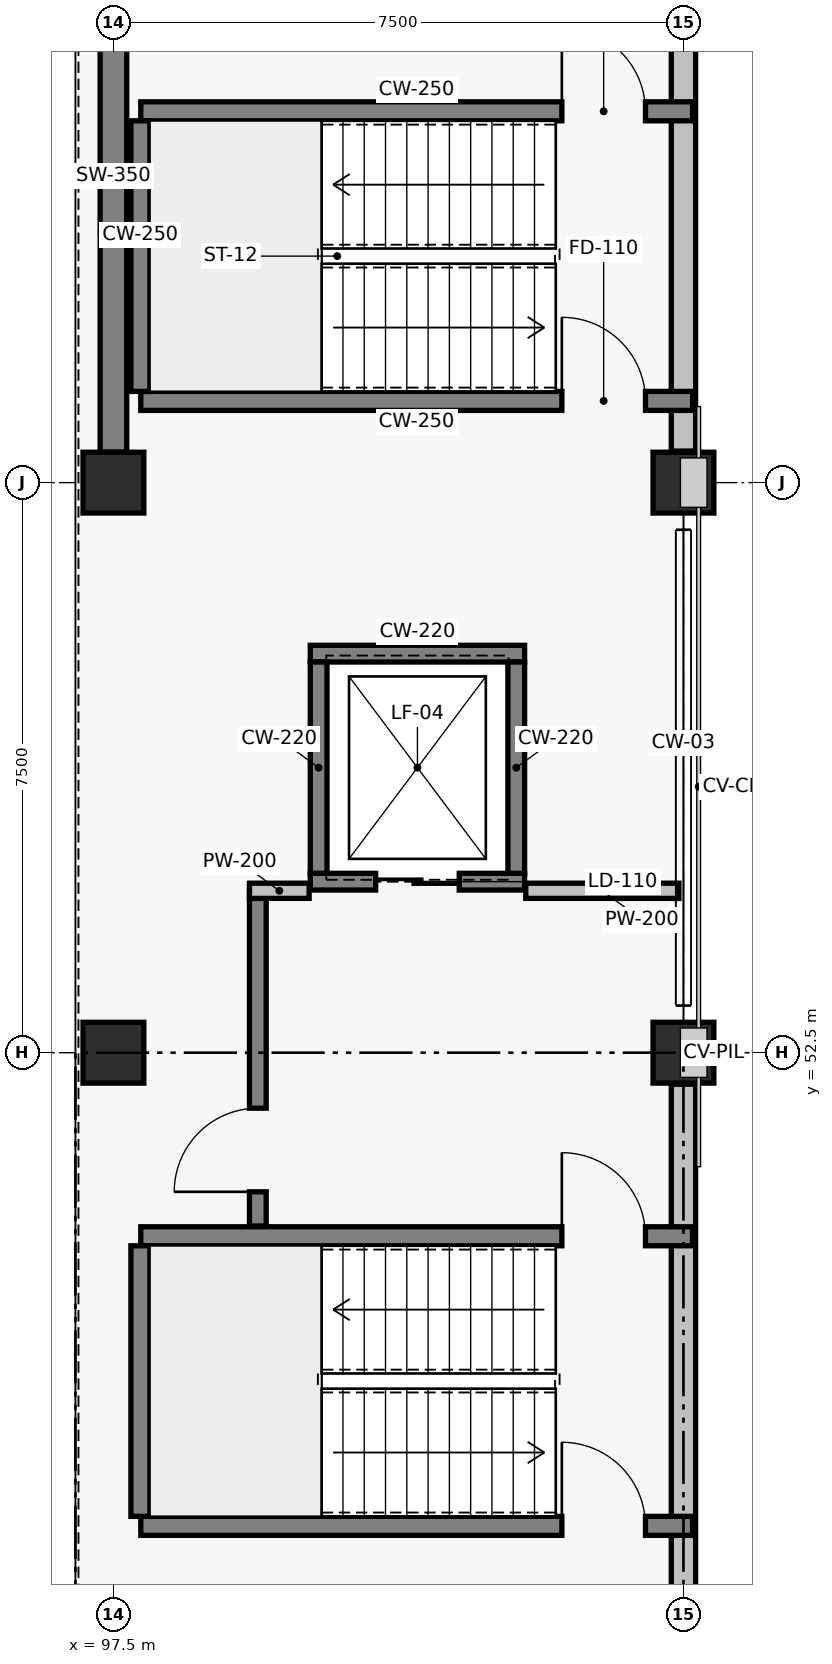
"""IFC4 building model, lengths in metres.
Left out: names, types, materials, properties, quantities, classifications, styles, units other than length and angle.
Written with IfcOpenShell. Run it as: python <this file> out.ifc"""

import sys

from ifc_helpers import new_model, si_unit, direction, frame, frame_2d, origin, origin_2d, place, context, subcontext, project, spatial, rectangle, extrude, element, fill, save


model = new_model("IFC4")
c1 = context("Model", 3, precision=1e-05, world=origin(), true_north=direction((0.0, 1.0)))
c2 = subcontext(c1, "Body", "Model", "MODEL_VIEW")
j1 = project(units=[si_unit("LENGTHUNIT", "METRE"), si_unit("PLANEANGLEUNIT", "RADIAN")], contexts=[c1])
p1 = place(None, origin())
s1 = spatial("IfcSite", under=j1, at=p1, CompositionType="ELEMENT")
p2 = place(p1, origin())
s2 = spatial("IfcBuilding", under=s1, at=p2, CompositionType="ELEMENT")
p3 = place(p2, frame((0.0, 0.0, 9.0)))
s3 = spatial("IfcBuildingStorey", under=s2, at=p3, CompositionType="ELEMENT", Elevation=9.0)
for number, where, z_axis, x_axis in (
    (1, (97.5, 52.5, 0.0), (0.0, 0.0, 1.0), (1.0, 0.0, 0.0)),
    (2, (97.5, 60.0, 0.0), (0.0, 0.0, 1.0), (1.0, 0.0, 0.0)),
    (3, (105.0, 52.5, 0.0), (0.0, 0.0, 1.0), (1.0, 0.0, 0.0)),
    (4, (105.0, 60.0, 0.0), (0.0, 0.0, 1.0), (1.0, 0.0, 0.0)),
):
    element("IfcColumn", number, at=place(p3, frame(where, z_axis=z_axis, x_axis=x_axis)), inside=s3, PredefinedType="COLUMN", context=c2, shape_type="SweptSolid", body=[
        extrude(rectangle(XDim=0.8, YDim=0.8, at=origin_2d()), origin(), (0.0, 0.0, 1.0), 4.2),
    ])
p4 = place(p3, frame((97.5, 60.4, 0.0), z_axis=(0.0, 0.0, 1.0), x_axis=(0.0, 1.0, 0.0)))
e5 = element("IfcWall", 5, at=p4, inside=s3, PredefinedType="SHEAR", context=c2, shape_type="SweptSolid", body=[
    extrude(rectangle(XDim=6.7, YDim=0.35, at=frame_2d((3.35, 0.0))), origin(), (0.0, 0.0, 1.0), 3.0),
])
p5 = place(p3, frame((105.0, 45.415, 0.0), z_axis=(0.0, 0.0, 1.0), x_axis=(0.0, 1.0, 0.0)))
e6 = element("IfcWall", 6, at=p5, inside=s3, PredefinedType="SOLIDWALL", context=c2, shape_type="SweptSolid", body=[
    extrude(rectangle(XDim=6.67, YDim=0.32, at=frame_2d((3.335, 0.0))), origin(), (0.0, 0.0, 1.0), 2.92),
])
p6 = place(p3, frame((105.0, 60.415, 0.0), z_axis=(0.0, 0.0, 1.0), x_axis=(0.0, 1.0, 0.0)))
e7 = element("IfcWall", 7, at=p6, inside=s3, PredefinedType="SOLIDWALL", context=c2, shape_type="SweptSolid", body=[
    extrude(rectangle(XDim=6.67, YDim=0.32, at=frame_2d((3.335, 0.0))), origin(), (0.0, 0.0, 1.0), 2.97),
])
p7 = place(p3, frame((97.86, 46.275, 0.0), z_axis=(0.0, 0.0, 1.0), x_axis=(1.0, 0.0, 0.0)))
e8 = element("IfcWall", 8, at=p7, inside=s3, PredefinedType="SOLIDWALL", context=c2, shape_type="SweptSolid", body=[
    extrude(rectangle(XDim=7.26, YDim=0.25, at=frame_2d((3.63, 0.0))), origin(), (0.0, 0.0, 1.0), 3.92),
])
p8 = place(p7, frame((5.54, 0.0, 0.0)))
e9 = element("IfcOpeningElement", 9, at=p8, cuts=e8, PredefinedType="OPENING", context=c2, shape_type="SweptSolid", body=[
    extrude(rectangle(XDim=1.1, YDim=2.15, at=frame_2d((0.55, 1.075))), frame((0.0, 0.135, 0.0), z_axis=(0.0, -1.0, 0.0), x_axis=(1.0, 0.0, 0.0)), (0.0, 0.0, 1.0), 0.27),
])
p9 = place(p3, frame((97.86, 50.085, 0.0), z_axis=(0.0, 0.0, 1.0), x_axis=(1.0, 0.0, 0.0)))
e10 = element("IfcWall", 10, at=p9, inside=s3, PredefinedType="SOLIDWALL", context=c2, shape_type="SweptSolid", body=[
    extrude(rectangle(XDim=7.26, YDim=0.25, at=frame_2d((3.63, 0.0))), origin(), (0.0, 0.0, 1.0), 3.92),
])
p10 = place(p9, frame((5.54, 0.0, 0.0)))
e11 = element("IfcOpeningElement", 11, at=p10, cuts=e10, PredefinedType="OPENING", context=c2, shape_type="SweptSolid", body=[
    extrude(rectangle(XDim=1.1, YDim=2.15, at=frame_2d((0.55, 1.075))), frame((0.0, 0.135, 0.0), z_axis=(0.0, -1.0, 0.0), x_axis=(1.0, 0.0, 0.0)), (0.0, 0.0, 1.0), 0.27),
])
p11 = place(p3, frame((97.855, 46.4, 0.0), z_axis=(0.0, 0.0, 1.0), x_axis=(0.0, 1.0, 0.0)))
e12 = element("IfcWall", 12, at=p11, inside=s3, PredefinedType="SOLIDWALL", context=c2, shape_type="SweptSolid", body=[
    extrude(rectangle(XDim=3.56, YDim=0.25, at=frame_2d((1.78, 0.0))), origin(), (0.0, 0.0, 1.0), 3.92),
])
p12 = place(p3, frame((97.86, 61.075, 0.0), z_axis=(0.0, 0.0, 1.0), x_axis=(1.0, 0.0, 0.0)))
e13 = element("IfcWall", 13, at=p12, inside=s3, PredefinedType="SOLIDWALL", context=c2, shape_type="SweptSolid", body=[
    extrude(rectangle(XDim=7.26, YDim=0.25, at=frame_2d((3.63, 0.0))), origin(), (0.0, 0.0, 1.0), 3.92),
])
p13 = place(p12, frame((5.54, 0.0, 0.0)))
e14 = element("IfcOpeningElement", 14, at=p13, cuts=e13, PredefinedType="OPENING", context=c2, shape_type="SweptSolid", body=[
    extrude(rectangle(XDim=1.1, YDim=2.15, at=frame_2d((0.55, 1.075))), frame((0.0, 0.135, 0.0), z_axis=(0.0, -1.0, 0.0), x_axis=(1.0, 0.0, 0.0)), (0.0, 0.0, 1.0), 0.27),
])
p14 = place(p3, frame((97.86, 64.885, 0.0), z_axis=(0.0, 0.0, 1.0), x_axis=(1.0, 0.0, 0.0)))
e15 = element("IfcWall", 15, at=p14, inside=s3, PredefinedType="SOLIDWALL", context=c2, shape_type="SweptSolid", body=[
    extrude(rectangle(XDim=7.26, YDim=0.25, at=frame_2d((3.63, 0.0))), origin(), (0.0, 0.0, 1.0), 3.92),
])
p15 = place(p14, frame((5.54, 0.0, 0.0)))
e16 = element("IfcOpeningElement", 16, at=p15, cuts=e15, PredefinedType="OPENING", context=c2, shape_type="SweptSolid", body=[
    extrude(rectangle(XDim=1.1, YDim=2.15, at=frame_2d((0.55, 1.075))), frame((0.0, 0.135, 0.0), z_axis=(0.0, -1.0, 0.0), x_axis=(1.0, 0.0, 0.0)), (0.0, 0.0, 1.0), 0.27),
])
p16 = place(p3, frame((97.855, 61.2, 0.0), z_axis=(0.0, 0.0, 1.0), x_axis=(0.0, 1.0, 0.0)))
e17 = element("IfcWall", 17, at=p16, inside=s3, PredefinedType="SOLIDWALL", context=c2, shape_type="SweptSolid", body=[
    extrude(rectangle(XDim=3.56, YDim=0.25, at=frame_2d((1.78, 0.0))), origin(), (0.0, 0.0, 1.0), 3.92),
])
p17 = place(p3, frame((100.09, 54.75, 0.0), z_axis=(0.0, 0.0, 1.0), x_axis=(1.0, 0.0, 0.0)))
e18 = element("IfcWall", 18, at=p17, inside=s3, PredefinedType="SOLIDWALL", context=c2, shape_type="SweptSolid", body=[
    extrude(rectangle(XDim=2.82, YDim=0.22, at=frame_2d((1.41, 0.0))), origin(), (0.0, 0.0, 1.0), 3.92),
])
p18 = place(p17, frame((0.86, 0.0, 0.0)))
e19 = element("IfcOpeningElement", 19, at=p18, cuts=e18, PredefinedType="OPENING", context=c2, shape_type="SweptSolid", body=[
    extrude(rectangle(XDim=1.1, YDim=2.15, at=frame_2d((0.55, 1.075))), frame((0.0, 0.12, 0.0), z_axis=(0.0, -1.0, 0.0), x_axis=(1.0, 0.0, 0.0)), (0.0, 0.0, 1.0), 0.24),
])
p19 = place(p3, frame((100.09, 57.75, 0.0), z_axis=(0.0, 0.0, 1.0), x_axis=(1.0, 0.0, 0.0)))
e20 = element("IfcWall", 20, at=p19, inside=s3, PredefinedType="SOLIDWALL", context=c2, shape_type="SweptSolid", body=[
    extrude(rectangle(XDim=2.82, YDim=0.22, at=frame_2d((1.41, 0.0))), origin(), (0.0, 0.0, 1.0), 3.92),
])
for number, where, z_axis, x_axis in (
    (21, (100.2, 54.86, 0.0), (0.0, 0.0, 1.0), (0.0, 1.0, 0.0)),
    (22, (102.8, 54.86, 0.0), (0.0, 0.0, 1.0), (0.0, 1.0, 0.0)),
):
    element("IfcWall", number, at=place(p3, frame(where, z_axis=z_axis, x_axis=x_axis)), inside=s3, PredefinedType="SOLIDWALL", context=c2, shape_type="SweptSolid", body=[
        extrude(rectangle(XDim=2.78, YDim=0.22, at=frame_2d((1.39, 0.0))), origin(), (0.0, 0.0, 1.0), 3.92),
    ])
p20 = place(p3, frame((99.4, 50.22, 0.0), z_axis=(0.0, 0.0, 1.0), x_axis=(0.0, 1.0, 0.0)))
e23 = element("IfcWall", 23, at=p20, inside=s3, PredefinedType="SOLIDWALL", context=c2, shape_type="SweptSolid", body=[
    extrude(rectangle(XDim=4.41, YDim=0.22, at=frame_2d((2.205, 0.0))), origin(), (0.0, 0.0, 1.0), 3.92),
])
p21 = place(p20, frame((0.45, 0.0, 0.0)))
e24 = element("IfcOpeningElement", 24, at=p21, cuts=e23, PredefinedType="OPENING", context=c2, shape_type="SweptSolid", body=[
    extrude(rectangle(XDim=1.1, YDim=2.15, at=frame_2d((0.55, 1.075))), frame((0.0, 0.12, 0.0), z_axis=(0.0, -1.0, 0.0), x_axis=(1.0, 0.0, 0.0)), (0.0, 0.0, 1.0), 0.24),
])
p22 = place(p3, frame((99.29, 54.63, 0.0), z_axis=(0.0, 0.0, 1.0), x_axis=(1.0, 0.0, 0.0)))
e25 = element("IfcWall", 25, at=p22, inside=s3, PredefinedType="PARTITIONING", context=c2, shape_type="SweptSolid", body=[
    extrude(rectangle(XDim=0.785, YDim=0.2, at=frame_2d((0.393, 0.0))), origin(), (0.0, 0.0, 1.0), 3.9),
])
p23 = place(p3, frame((102.925, 54.63, 0.0), z_axis=(0.0, 0.0, 1.0), x_axis=(1.0, 0.0, 0.0)))
e26 = element("IfcWall", 26, at=p23, inside=s3, PredefinedType="PARTITIONING", context=c2, shape_type="SweptSolid", body=[
    extrude(rectangle(XDim=2.015, YDim=0.2, at=frame_2d((1.007, 0.0))), origin(), (0.0, 0.0, 1.0), 3.13),
])
p24 = place(p8, origin())
e27 = element("IfcDoor", 27, at=p24, inside=s3, OperationType="SINGLE_SWING_LEFT", PredefinedType="DOOR", context=c2, shape_type="SweptSolid", body=[
    extrude(rectangle(XDim=1.1, YDim=2.15, at=frame_2d((0.55, 1.075))), frame((0.0, 0.025, 0.0), z_axis=(0.0, -1.0, 0.0), x_axis=(1.0, 0.0, 0.0)), (0.0, 0.0, 1.0), 0.05),
])
fill(e9, e27)
p25 = place(p10, frame((1.1, 0.0, 0.0), z_axis=(0.0, 0.0, 1.0), x_axis=(-1.0, 0.0, 0.0)))
e28 = element("IfcDoor", 28, at=p25, inside=s3, OperationType="SINGLE_SWING_RIGHT", PredefinedType="DOOR", context=c2, shape_type="SweptSolid", body=[
    extrude(rectangle(XDim=1.1, YDim=2.15, at=frame_2d((0.55, 1.075))), frame((0.0, 0.025, 0.0), z_axis=(0.0, -1.0, 0.0), x_axis=(1.0, 0.0, 0.0)), (0.0, 0.0, 1.0), 0.05),
])
fill(e11, e28)
p26 = place(p13, origin())
e29 = element("IfcDoor", 29, at=p26, inside=s3, OperationType="SINGLE_SWING_LEFT", PredefinedType="DOOR", context=c2, shape_type="SweptSolid", body=[
    extrude(rectangle(XDim=1.1, YDim=2.15, at=frame_2d((0.55, 1.075))), frame((0.0, 0.025, 0.0), z_axis=(0.0, -1.0, 0.0), x_axis=(1.0, 0.0, 0.0)), (0.0, 0.0, 1.0), 0.05),
])
fill(e14, e29)
p27 = place(p15, frame((1.1, 0.0, 0.0), z_axis=(0.0, 0.0, 1.0), x_axis=(-1.0, 0.0, 0.0)))
e30 = element("IfcDoor", 30, at=p27, inside=s3, OperationType="SINGLE_SWING_RIGHT", PredefinedType="DOOR", context=c2, shape_type="SweptSolid", body=[
    extrude(rectangle(XDim=1.1, YDim=2.15, at=frame_2d((0.55, 1.075))), frame((0.0, 0.025, 0.0), z_axis=(0.0, -1.0, 0.0), x_axis=(1.0, 0.0, 0.0)), (0.0, 0.0, 1.0), 0.05),
])
fill(e16, e30)
p28 = place(p18, origin())
e31 = element("IfcDoor", 31, at=p28, inside=s3, OperationType="SLIDING_TO_LEFT", PredefinedType="DOOR", context=c2, shape_type="SweptSolid", body=[
    extrude(rectangle(XDim=1.1, YDim=2.15, at=frame_2d((0.55, 1.075))), frame((0.0, 0.025, 0.0), z_axis=(0.0, -1.0, 0.0), x_axis=(1.0, 0.0, 0.0)), (0.0, 0.0, 1.0), 0.05),
])
fill(e19, e31)
p29 = place(p21, origin())
e32 = element("IfcDoor", 32, at=p29, inside=s3, OperationType="SINGLE_SWING_LEFT", PredefinedType="DOOR", context=c2, shape_type="SweptSolid", body=[
    extrude(rectangle(XDim=1.1, YDim=2.15, at=frame_2d((0.55, 1.075))), frame((0.0, 0.025, 0.0), z_axis=(0.0, -1.0, 0.0), x_axis=(1.0, 0.0, 0.0)), (0.0, 0.0, 1.0), 0.05),
])
fill(e24, e32)
save(model, sys.argv[1])
